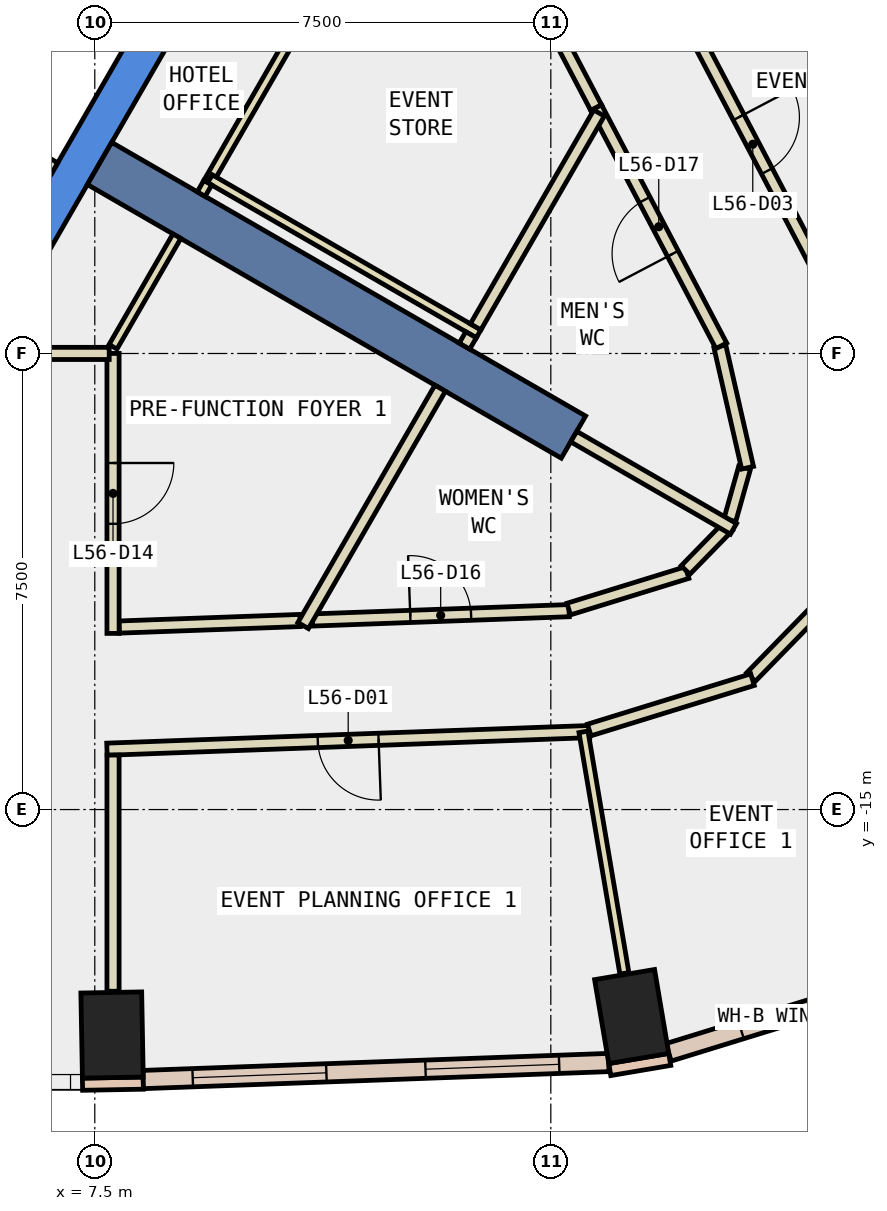
"""IFC4 building model, lengths in metres.
Left out: names, types, materials, properties, quantities, classifications, styles, units other than length and angle.
Written with IfcOpenShell. Run it as: python <this file> out.ifc"""

import sys

from ifc_helpers import new_model, si_unit, direction, frame, frame_2d, origin, origin_2d, place, context, subcontext, project, spatial, polyline, rectangle, outline, extrude, element, fill, save


model = new_model("IFC4")
c1 = context("Model", 3, precision=1e-05, world=origin(), true_north=direction((0.0, 1.0)))
c2 = subcontext(c1, "Body", "Model", "MODEL_VIEW")
j1 = project(units=[si_unit("LENGTHUNIT", "METRE"), si_unit("PLANEANGLEUNIT", "RADIAN")], contexts=[c1])
p1 = place(None, origin())
s1 = spatial("IfcSite", under=j1, at=p1, CompositionType="ELEMENT")
p2 = place(p1, origin())
s2 = spatial("IfcBuilding", under=s1, at=p2, CompositionType="ELEMENT")
p3 = place(p2, frame((0.0, 0.0, 248.6)))
s3 = spatial("IfcBuildingStorey", under=s2, at=p3, CompositionType="ELEMENT", Elevation=248.6)
for number, where, z_axis, x_axis in (
    (1, (7.784, -18.708, -0.34), (0.0, 0.0, 1.0), (1.0, 0.018, 0.0)),
    (2, (16.33, -18.404, -0.34), (0.0, 0.0, 1.0), (0.986, 0.167, 0.0)),
):
    element("IfcColumn", number, at=place(p3, frame(where, z_axis=z_axis, x_axis=x_axis)), inside=s3, PredefinedType="COLUMN", context=c2, shape_type="SweptSolid", body=[
        extrude(rectangle(XDim=1.0, YDim=1.4, at=origin_2d()), origin(), (0.0, 0.0, 1.0), 3.6),
    ])
p4 = place(p3, frame((0.0, 0.0, -0.34)))
e3 = element("IfcWall", 3, at=p4, inside=s3, PredefinedType="SHEAR", context=c2, shape_type="SweptSolid", body=[
    extrude(outline(polyline([(5.774, -7.5), (11.547, 2.5), (10.854, 2.5), (5.427, -6.9), (5.774, -7.5)])), origin(), (0.0, 0.0, 1.0), 3.6),
])
p5 = place(p3, frame((7.578, -4.375, -0.34), z_axis=(0.0, 0.0, 1.0), x_axis=(0.866024315419, -0.5000018851, 0.0)))
e4 = element("IfcWall", 4, at=p5, inside=s3, PredefinedType="SHEAR", context=c2, shape_type="SweptSolid", body=[
    extrude(rectangle(XDim=9.0, YDim=0.8, at=frame_2d((4.5, 0.0))), origin(), (0.0, 0.0, 1.0), 3.6),
])
for number, where, z_axis, x_axis in (
    (5, (7.298, -19.517, 0.0), (0.0, 0.0, 1.0), (1.0, 0.018, 0.0)),
    (6, (15.97, -19.276, 0.0), (0.0, 0.0, 1.0), (0.986, 0.167, 0.0)),
):
    element("IfcWall", number, at=place(p3, frame(where, z_axis=z_axis, x_axis=x_axis)), inside=s3, PredefinedType="STANDARD", context=c2, shape_type="SweptSolid", body=[
        extrude(rectangle(XDim=1.0, YDim=0.2, at=frame_2d((0.5, 0.0))), origin(), (0.0, 0.0, 1.0), 3.26),
    ])
p6 = place(p3, frame((8.296, -19.44, 0.0), z_axis=(0.0, 0.0, 1.0), x_axis=(0.999331753125, 0.036551979363, 0.0)))
e7 = element("IfcWall", 7, at=p6, inside=s3, PredefinedType="STANDARD", context=c2, shape_type="SweptSolid", body=[
    extrude(rectangle(XDim=7.661, YDim=0.3, at=frame_2d((3.831, 0.0))), origin(), (0.0, 0.0, 1.0), 3.26),
])
p7 = place(p6, frame((0.815, 0.0, 0.9)))
e8 = element("IfcOpeningElement", 8, at=p7, cuts=e7, PredefinedType="OPENING", context=c2, shape_type="SweptSolid", body=[
    extrude(rectangle(XDim=2.2, YDim=2.0, at=frame_2d((1.1, 1.0))), frame((0.0, 0.16, 0.0), z_axis=(0.0, -1.0, 0.0), x_axis=(1.0, 0.0, 0.0)), (0.0, 0.0, 1.0), 0.32),
])
p8 = place(p6, frame((4.646, 0.0, 0.9)))
e9 = element("IfcOpeningElement", 9, at=p8, cuts=e7, PredefinedType="OPENING", context=c2, shape_type="SweptSolid", body=[
    extrude(rectangle(XDim=2.2, YDim=2.0, at=frame_2d((1.1, 1.0))), frame((0.0, 0.16, 0.0), z_axis=(0.0, -1.0, 0.0), x_axis=(1.0, 0.0, 0.0)), (0.0, 0.0, 1.0), 0.32),
])
p9 = place(p3, frame((16.936, -18.993, 0.0), z_axis=(0.0, 0.0, 1.0), x_axis=(0.955646189569, 0.2945171648, 0.0)))
e10 = element("IfcWall", 10, at=p9, inside=s3, PredefinedType="STANDARD", context=c2, shape_type="SweptSolid", body=[
    extrude(rectangle(XDim=3.898, YDim=0.3, at=frame_2d((1.949, 0.0))), origin(), (0.0, 0.0, 1.0), 3.26),
])
p10 = place(p9, frame((1.249, 0.0, 0.9)))
e11 = element("IfcOpeningElement", 11, at=p10, cuts=e10, PredefinedType="OPENING", context=c2, shape_type="SweptSolid", body=[
    extrude(rectangle(XDim=1.4, YDim=2.0, at=frame_2d((0.7, 1.0))), frame((0.0, 0.16, 0.0), z_axis=(0.0, -1.0, 0.0), x_axis=(1.0, 0.0, 0.0)), (0.0, 0.0, 1.0), 0.32),
])
p11 = place(p3, frame((7.9, -11.999, 0.0), z_axis=(0.0, 0.0, 1.0), x_axis=(0.999343711998, 0.036223546064, 0.0)))
e12 = element("IfcWall", 12, at=p11, inside=s3, PredefinedType="PARTITIONING", context=c2, shape_type="SweptSolid", body=[
    extrude(rectangle(XDim=2.979, YDim=0.2, at=frame_2d((1.49, 0.0))), origin(), (0.0, 0.0, 1.0), 3.26),
])
p12 = place(p3, frame((15.746, -3.458, 0.0), z_axis=(0.0, 0.0, 1.0), x_axis=(-0.464794189951, 0.885418748948, 0.0)))
e13 = element("IfcWall", 13, at=p12, inside=s3, PredefinedType="PARTITIONING", context=c2, shape_type="SweptSolid", body=[
    extrude(rectangle(XDim=1.205, YDim=0.2, at=frame_2d((0.603, 0.0))), origin(), (0.0, 0.0, 1.0), 3.26),
])
p13 = place(p3, frame((11.077, -11.883, 0.0), z_axis=(0.0, 0.0, 1.0), x_axis=(0.999335333519, 0.036453959732, 0.0)))
e14 = element("IfcWall", 14, at=p13, inside=s3, PredefinedType="PARTITIONING", context=c2, shape_type="SweptSolid", body=[
    extrude(rectangle(XDim=4.226, YDim=0.2, at=frame_2d((2.113, 0.0))), origin(), (0.0, 0.0, 1.0), 3.26),
])
p14 = place(p13, frame((1.613, 0.0, 0.0)))
e15 = element("IfcOpeningElement", 15, at=p14, cuts=e14, PredefinedType="OPENING", context=c2, shape_type="SweptSolid", body=[
    extrude(rectangle(XDim=1.0, YDim=2.1, at=frame_2d((0.5, 1.05))), frame((0.0, 0.11, 0.0), z_axis=(0.0, -1.0, 0.0), x_axis=(1.0, 0.0, 0.0)), (0.0, 0.0, 1.0), 0.22),
])
p15 = place(p3, frame((15.295, -11.703, 0.0), z_axis=(0.0, 0.0, 1.0), x_axis=(0.95563113363, 0.294566013716, 0.0)))
e16 = element("IfcWall", 16, at=p15, inside=s3, PredefinedType="PARTITIONING", context=c2, shape_type="SweptSolid", body=[
    extrude(rectangle(XDim=2.036, YDim=0.2, at=frame_2d((1.018, 0.0))), origin(), (0.0, 0.0, 1.0), 3.26),
])
p16 = place(p3, frame((17.215, -11.061, 0.0), z_axis=(0.0, 0.0, 1.0), x_axis=(0.698527813511, 0.715582904877, 0.0)))
e17 = element("IfcWall", 17, at=p16, inside=s3, PredefinedType="PARTITIONING", context=c2, shape_type="SweptSolid", body=[
    extrude(rectangle(XDim=1.002, YDim=0.2, at=frame_2d((0.501, 0.0))), origin(), (0.0, 0.0, 1.0), 3.26),
])
p17 = place(p3, frame((17.945, -10.238, 0.0), z_axis=(0.0, 0.0, 1.0), x_axis=(0.270785141481, 0.962639811743, 0.0)))
e18 = element("IfcWall", 18, at=p17, inside=s3, PredefinedType="PARTITIONING", context=c2, shape_type="SweptSolid", body=[
    extrude(rectangle(XDim=0.894, YDim=0.2, at=frame_2d((0.447, 0.0))), origin(), (0.0, 0.0, 1.0), 3.26),
])
p18 = place(p3, frame((18.236, -9.379, 0.0), z_axis=(0.0, 0.0, 1.0), x_axis=(-0.222760041204, 0.974873306662, 0.0)))
e19 = element("IfcWall", 19, at=p18, inside=s3, PredefinedType="PARTITIONING", context=c2, shape_type="SweptSolid", body=[
    extrude(rectangle(XDim=2.047, YDim=0.2, at=frame_2d((1.024, 0.0))), origin(), (0.0, 0.0, 1.0), 3.26),
])
p19 = place(p3, frame((17.804, -7.374, 0.0), z_axis=(0.0, 0.0, 1.0), x_axis=(-0.465179971699, 0.885216128372, 0.0)))
e20 = element("IfcWall", 20, at=p19, inside=s3, PredefinedType="PARTITIONING", context=c2, shape_type="SweptSolid", body=[
    extrude(rectangle(XDim=4.424, YDim=0.2, at=frame_2d((2.212, 0.0))), origin(), (0.0, 0.0, 1.0), 3.26),
])
p20 = place(p19, frame((1.712, 0.0, 0.0)))
e21 = element("IfcOpeningElement", 21, at=p20, cuts=e20, PredefinedType="OPENING", context=c2, shape_type="SweptSolid", body=[
    extrude(rectangle(XDim=1.0, YDim=2.1, at=frame_2d((0.5, 1.05))), frame((0.0, 0.11, 0.0), z_axis=(0.0, -1.0, 0.0), x_axis=(1.0, 0.0, 0.0)), (0.0, 0.0, 1.0), 0.22),
])
p21 = place(p3, frame((15.636, -13.718, 0.0), z_axis=(0.0, 0.0, 1.0), x_axis=(-0.99933282306, -0.036522715615, 0.0)))
e22 = element("IfcWall", 22, at=p21, inside=s3, PredefinedType="PARTITIONING", context=c2, shape_type="SweptSolid", body=[
    extrude(rectangle(XDim=7.941, YDim=0.2, at=frame_2d((3.971, 0.0))), origin(), (0.0, 0.0, 1.0), 3.26),
])
p22 = place(p21, frame((3.471, 0.0, 0.0)))
e23 = element("IfcOpeningElement", 23, at=p22, cuts=e22, PredefinedType="OPENING", context=c2, shape_type="SweptSolid", body=[
    extrude(rectangle(XDim=1.0, YDim=2.1, at=frame_2d((0.5, 1.05))), frame((0.0, 0.11, 0.0), z_axis=(0.0, -1.0, 0.0), x_axis=(1.0, 0.0, 0.0)), (0.0, 0.0, 1.0), 0.22),
])
p23 = place(p3, frame((19.633, -11.447, 0.0), z_axis=(0.0, 0.0, 1.0), x_axis=(-0.698477855606, -0.715631668687, 0.0)))
e24 = element("IfcWall", 24, at=p23, inside=s3, PredefinedType="PARTITIONING", context=c2, shape_type="SweptSolid", body=[
    extrude(rectangle(XDim=1.921, YDim=0.2, at=frame_2d((0.961, 0.0))), origin(), (0.0, 0.0, 1.0), 3.26),
])
p24 = place(p3, frame((18.317, -12.864, 0.0), z_axis=(0.0, 0.0, 1.0), x_axis=(-0.955600342663, -0.294665887239, 0.0)))
e25 = element("IfcWall", 25, at=p24, inside=s3, PredefinedType="PARTITIONING", context=c2, shape_type="SweptSolid", body=[
    extrude(rectangle(XDim=2.81, YDim=0.2, at=frame_2d((1.405, 0.0))), origin(), (0.0, 0.0, 1.0), 3.26),
])
p25 = place(p3, frame((16.947, -1.443, 0.0), z_axis=(0.0, 0.0, 1.0), x_axis=(0.465133414481, -0.88524059257, 0.0)))
e26 = element("IfcWall", 26, at=p25, inside=s3, PredefinedType="PARTITIONING", context=c2, shape_type="SweptSolid", body=[
    extrude(rectangle(XDim=5.91, YDim=0.2, at=frame_2d((2.955, 0.0))), origin(), (0.0, 0.0, 1.0), 3.26),
])
p26 = place(p25, frame((2.455, 0.0, 0.0)))
e27 = element("IfcOpeningElement", 27, at=p26, cuts=e26, PredefinedType="OPENING", context=c2, shape_type="SweptSolid", body=[
    extrude(rectangle(XDim=1.0, YDim=2.1, at=frame_2d((0.5, 1.05))), frame((0.0, 0.11, 0.0), z_axis=(0.0, -1.0, 0.0), x_axis=(1.0, 0.0, 0.0)), (0.0, 0.0, 1.0), 0.22),
])
p27 = place(p3, frame((5.751, -3.938, 0.0), z_axis=(0.0, 0.0, 1.0), x_axis=(0.500034260056, 0.866005622828, 0.0)))
e28 = element("IfcWall", 28, at=p27, inside=s3, PredefinedType="PARTITIONING", context=c2, shape_type="SweptSolid", body=[
    extrude(rectangle(XDim=5.399, YDim=0.2, at=frame_2d((2.7, 0.0))), origin(), (0.0, 0.0, 1.0), 3.26),
])
p28 = place(p3, frame((6.841, -4.452, 0.0), z_axis=(0.0, 0.0, 1.0), x_axis=(-0.86621513555, 0.499671230855, 0.0)))
e29 = element("IfcWall", 29, at=p28, inside=s3, PredefinedType="PARTITIONING", context=c2, shape_type="SweptSolid", body=[
    extrude(rectangle(XDim=1.1, YDim=0.2, at=frame_2d((0.55, 0.0))), origin(), (0.0, 0.0, 1.0), 3.26),
])
p29 = place(p3, frame((7.8, -7.39, 0.0), z_axis=(0.0, 0.0, 1.0), x_axis=(0.499977374825, 0.866038466041, 0.0)))
e30 = element("IfcWall", 30, at=p29, inside=s3, PredefinedType="PARTITIONING", context=c2, shape_type="SweptSolid", body=[
    extrude(rectangle(XDim=2.1, YDim=0.15, at=frame_2d((1.05, 0.0))), origin(), (0.0, 0.0, 1.0), 3.26),
])
p30 = place(p3, frame((9.358, -4.692, 0.0), z_axis=(0.0, 0.0, 1.0), x_axis=(0.500027777314, 0.866009365951, 0.0)))
e31 = element("IfcWall", 31, at=p30, inside=s3, PredefinedType="PARTITIONING", context=c2, shape_type="SweptSolid", body=[
    extrude(rectangle(XDim=7.36, YDim=0.15, at=frame_2d((3.68, 0.0))), origin(), (0.0, 0.0, 1.0), 3.26),
])
p31 = place(p3, frame((7.8, -7.499, 0.0), z_axis=(0.0, 0.0, 1.0), x_axis=(0.0, -1.0, 0.0)))
e32 = element("IfcWall", 32, at=p31, inside=s3, PredefinedType="PARTITIONING", context=c2, shape_type="SweptSolid", body=[
    extrude(rectangle(XDim=4.604, YDim=0.2, at=frame_2d((2.302, 0.0))), origin(), (0.0, 0.0, 1.0), 3.26),
])
p32 = place(p31, frame((1.802, 0.0, 0.0)))
e33 = element("IfcOpeningElement", 33, at=p32, cuts=e32, PredefinedType="OPENING", context=c2, shape_type="SweptSolid", body=[
    extrude(rectangle(XDim=1.0, YDim=2.1, at=frame_2d((0.5, 1.05))), frame((0.0, 0.11, 0.0), z_axis=(0.0, -1.0, 0.0), x_axis=(1.0, 0.0, 0.0)), (0.0, 0.0, 1.0), 0.22),
])
p33 = place(p3, frame((7.8, -14.104, 0.0), z_axis=(0.0, 0.0, 1.0), x_axis=(0.0, -1.0, 0.0)))
e34 = element("IfcWall", 34, at=p33, inside=s3, PredefinedType="PARTITIONING", context=c2, shape_type="SweptSolid", body=[
    extrude(rectangle(XDim=3.884, YDim=0.2, at=frame_2d((1.942, 0.0))), origin(), (0.0, 0.0, 1.0), 3.26),
])
p34 = place(p3, frame((9.395, -4.627, 0.0), z_axis=(0.0, 0.0, 1.0), x_axis=(0.866034131428, -0.499984882974, 0.0)))
e35 = element("IfcWall", 35, at=p34, inside=s3, PredefinedType="PARTITIONING", context=c2, shape_type="SweptSolid", body=[
    extrude(rectangle(XDim=5.1, YDim=0.15, at=frame_2d((2.55, 0.0))), origin(), (0.0, 0.0, 1.0), 3.26),
])
p35 = place(p3, frame((13.18, -8.071, 0.0), z_axis=(0.0, 0.0, 1.0), x_axis=(-0.499914724673, -0.86607463192, 0.0)))
e36 = element("IfcWall", 36, at=p35, inside=s3, PredefinedType="PARTITIONING", context=c2, shape_type="SweptSolid", body=[
    extrude(rectangle(XDim=4.507, YDim=0.2, at=frame_2d((2.253, 0.0))), origin(), (0.0, 0.0, 1.0), 3.26),
])
p36 = place(p3, frame((13.688, -7.192, 0.0), z_axis=(0.0, 0.0, 1.0), x_axis=(-0.499787711288, -0.866147934042, 0.0)))
e37 = element("IfcWall", 37, at=p36, inside=s3, PredefinedType="PARTITIONING", context=c2, shape_type="SweptSolid", body=[
    extrude(rectangle(XDim=0.216, YDim=0.2, at=frame_2d((0.108, 0.0))), origin(), (0.0, 0.0, 1.0), 3.26),
])
p37 = place(p3, frame((15.793, -3.546, 0.0), z_axis=(0.0, 0.0, 1.0), x_axis=(-0.500000064182, -0.866025366729, 0.0)))
e38 = element("IfcWall", 38, at=p37, inside=s3, PredefinedType="PARTITIONING", context=c2, shape_type="SweptSolid", body=[
    extrude(rectangle(XDim=4.06, YDim=0.2, at=frame_2d((2.03, 0.0))), origin(), (0.0, 0.0, 1.0), 3.26),
])
p38 = place(p3, frame((15.377, -8.867, 0.0), z_axis=(0.0, 0.0, 1.0), x_axis=(0.865965767548, -0.500103278768, 0.0)))
e39 = element("IfcWall", 39, at=p38, inside=s3, PredefinedType="PARTITIONING", context=c2, shape_type="SweptSolid", body=[
    extrude(rectangle(XDim=3.033, YDim=0.2, at=frame_2d((1.517, 0.0))), origin(), (0.0, 0.0, 1.0), 3.26),
])
p39 = place(p3, frame((15.537, -13.722, 0.0), z_axis=(0.0, 0.0, 1.0), x_axis=(0.167012380144, -0.985954798598, 0.0)))
e40 = element("IfcWall", 40, at=p39, inside=s3, PredefinedType="PARTITIONING", context=c2, shape_type="SweptSolid", body=[
    extrude(rectangle(XDim=4.029, YDim=0.15, at=frame_2d((2.014, 0.0))), origin(), (0.0, 0.0, 1.0), 3.26),
])
p40 = place(p3, frame((9.25, -4.879, 0.0), z_axis=(0.0, 0.0, 1.0), x_axis=(0.499787711288, 0.866147934042, 0.0)))
e41 = element("IfcWall", 41, at=p40, inside=s3, PredefinedType="PARTITIONING", context=c2, shape_type="SweptSolid", body=[
    extrude(rectangle(XDim=0.216, YDim=0.15, at=frame_2d((0.108, 0.0))), origin(), (0.0, 0.0, 1.0), 3.26),
])
p41 = place(p3, frame((5.944, -7.499, 0.0), z_axis=(0.0, 0.0, 1.0), x_axis=(1.0, 0.0, 0.0)))
e42 = element("IfcWall", 42, at=p41, inside=s3, PredefinedType="PARTITIONING", context=c2, shape_type="SweptSolid", body=[
    extrude(rectangle(XDim=1.793, YDim=0.2, at=frame_2d((0.896, 0.0))), origin(), (0.0, 0.0, 1.0), 3.26),
])
p42 = place(p3, frame((5.492, -3.788, 0.0), z_axis=(0.0, 0.0, 1.0), x_axis=(0.500034260056, 0.866005622828, 0.0)))
e43 = element("IfcWall", 43, at=p42, inside=s3, PredefinedType="STANDARD", context=c2, shape_type="SweptSolid", body=[
    extrude(rectangle(XDim=5.399, YDim=0.2, at=frame_2d((2.7, 0.0))), origin(), (0.0, 0.0, 1.0), 3.26),
])
p43 = place(p7, origin())
e44 = element("IfcWindow", 44, at=p43, inside=s3, PartitioningType="SINGLE_PANEL", PredefinedType="WINDOW", context=c2, shape_type="SweptSolid", body=[
    extrude(rectangle(XDim=2.2, YDim=2.0, at=frame_2d((1.1, 1.0))), frame((0.0, 0.03, 0.0), z_axis=(0.0, -1.0, 0.0), x_axis=(1.0, 0.0, 0.0)), (0.0, 0.0, 1.0), 0.06),
])
fill(e8, e44)
p44 = place(p8, origin())
e45 = element("IfcWindow", 45, at=p44, inside=s3, PartitioningType="SINGLE_PANEL", PredefinedType="WINDOW", context=c2, shape_type="SweptSolid", body=[
    extrude(rectangle(XDim=2.2, YDim=2.0, at=frame_2d((1.1, 1.0))), frame((0.0, 0.03, 0.0), z_axis=(0.0, -1.0, 0.0), x_axis=(1.0, 0.0, 0.0)), (0.0, 0.0, 1.0), 0.06),
])
fill(e9, e45)
p45 = place(p10, origin())
e46 = element("IfcWindow", 46, at=p45, inside=s3, PartitioningType="SINGLE_PANEL", PredefinedType="WINDOW", context=c2, shape_type="SweptSolid", body=[
    extrude(rectangle(XDim=1.4, YDim=2.0, at=frame_2d((0.7, 1.0))), frame((0.0, 0.03, 0.0), z_axis=(0.0, -1.0, 0.0), x_axis=(1.0, 0.0, 0.0)), (0.0, 0.0, 1.0), 0.06),
])
fill(e11, e46)
p46 = place(p22, origin())
e47 = element("IfcDoor", 47, at=p46, inside=s3, OperationType="SINGLE_SWING_RIGHT", PredefinedType="DOOR", context=c2, shape_type="SweptSolid", body=[
    extrude(rectangle(XDim=1.0, YDim=2.1, at=frame_2d((0.5, 1.05))), frame((0.0, 0.025, 0.0), z_axis=(0.0, -1.0, 0.0), x_axis=(1.0, 0.0, 0.0)), (0.0, 0.0, 1.0), 0.05),
])
fill(e23, e47)
p47 = place(p26, origin())
e48 = element("IfcDoor", 48, at=p47, inside=s3, OperationType="SINGLE_SWING_LEFT", PredefinedType="DOOR", context=c2, shape_type="SweptSolid", body=[
    extrude(rectangle(XDim=1.0, YDim=2.1, at=frame_2d((0.5, 1.05))), frame((0.0, 0.025, 0.0), z_axis=(0.0, -1.0, 0.0), x_axis=(1.0, 0.0, 0.0)), (0.0, 0.0, 1.0), 0.05),
])
fill(e27, e48)
p48 = place(p32, origin())
e49 = element("IfcDoor", 49, at=p48, inside=s3, OperationType="SINGLE_SWING_LEFT", PredefinedType="DOOR", context=c2, shape_type="SweptSolid", body=[
    extrude(rectangle(XDim=1.0, YDim=2.1, at=frame_2d((0.5, 1.05))), frame((0.0, 0.025, 0.0), z_axis=(0.0, -1.0, 0.0), x_axis=(1.0, 0.0, 0.0)), (0.0, 0.0, 1.0), 0.05),
])
fill(e33, e49)
p49 = place(p14, origin())
e50 = element("IfcDoor", 50, at=p49, inside=s3, OperationType="SINGLE_SWING_LEFT", PredefinedType="DOOR", context=c2, shape_type="SweptSolid", body=[
    extrude(rectangle(XDim=1.0, YDim=2.1, at=frame_2d((0.5, 1.05))), frame((0.0, 0.025, 0.0), z_axis=(0.0, -1.0, 0.0), x_axis=(1.0, 0.0, 0.0)), (0.0, 0.0, 1.0), 0.05),
])
fill(e15, e50)
p50 = place(p20, origin())
e51 = element("IfcDoor", 51, at=p50, inside=s3, OperationType="SINGLE_SWING_LEFT", PredefinedType="DOOR", context=c2, shape_type="SweptSolid", body=[
    extrude(rectangle(XDim=1.0, YDim=2.1, at=frame_2d((0.5, 1.05))), frame((0.0, 0.025, 0.0), z_axis=(0.0, -1.0, 0.0), x_axis=(1.0, 0.0, 0.0)), (0.0, 0.0, 1.0), 0.05),
])
fill(e21, e51)
save(model, sys.argv[1])
